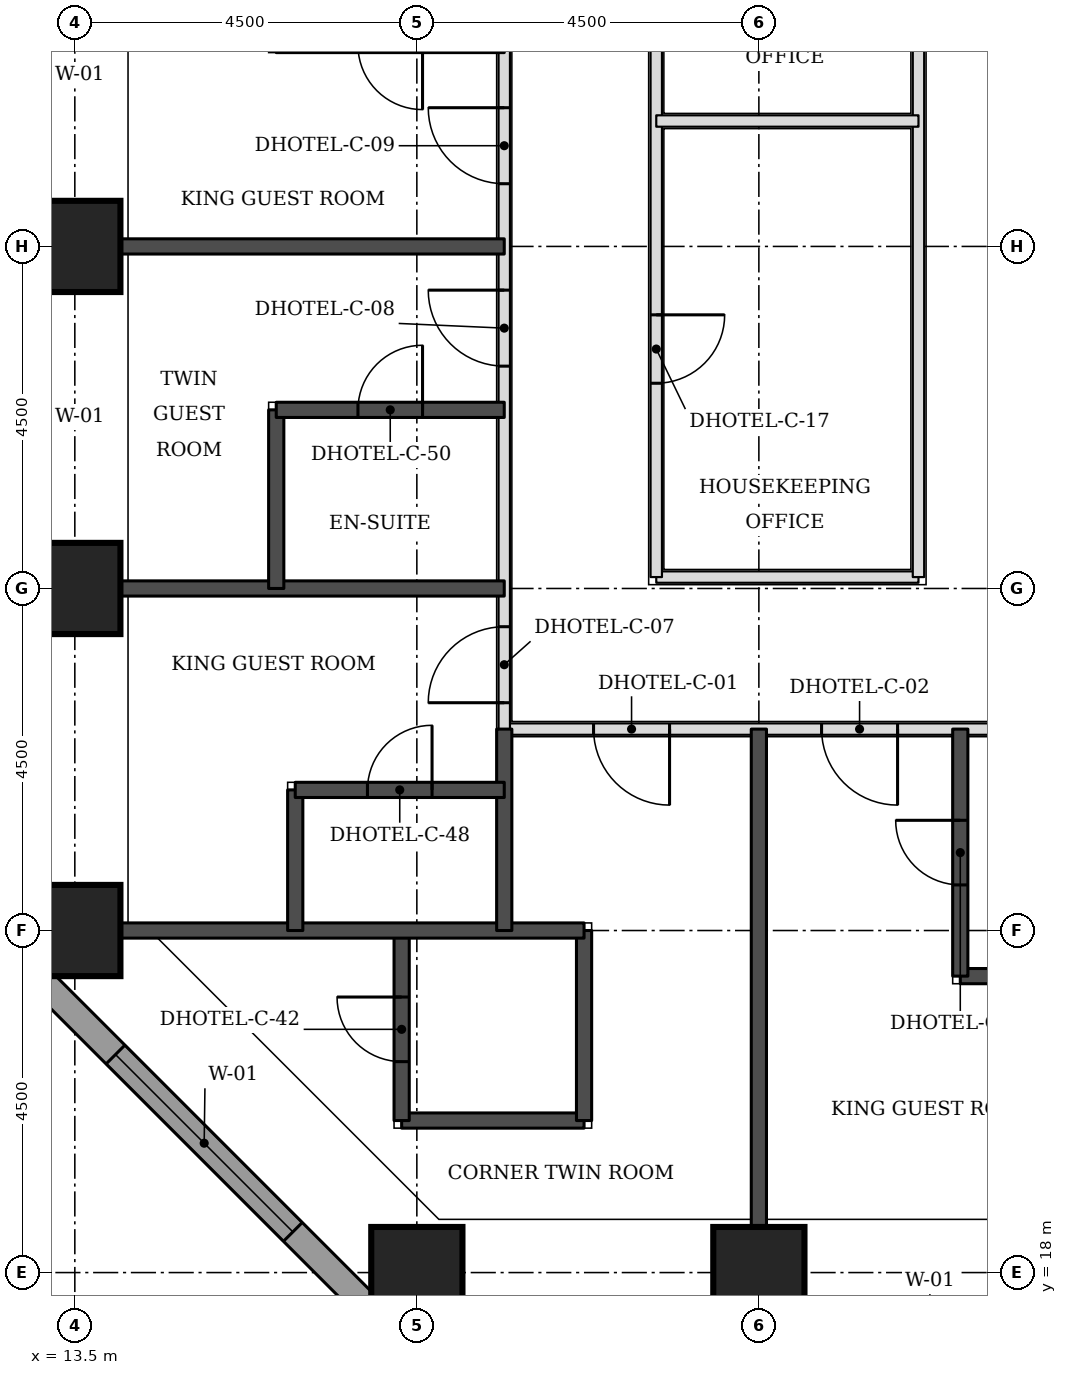
"""IFC4 building model, lengths in metres.
Left out: names, types, materials, properties, quantities, classifications, styles, units other than length and angle.
Written with IfcOpenShell. Run it as: python <this file> out.ifc"""

import sys

from ifc_helpers import new_model, si_unit, direction, frame, frame_2d, origin, origin_2d, place, context, subcontext, project, spatial, rectangle, extrude, element, fill, save


model = new_model("IFC4")
c1 = context("Model", 3, precision=1e-05, world=origin(), true_north=direction((0.0, 1.0)))
c2 = subcontext(c1, "Body", "Model", "MODEL_VIEW")
j1 = project(units=[si_unit("LENGTHUNIT", "METRE"), si_unit("PLANEANGLEUNIT", "RADIAN")], contexts=[c1])
p1 = place(None, origin())
s1 = spatial("IfcSite", under=j1, at=p1, CompositionType="ELEMENT")
p2 = place(p1, origin())
s2 = spatial("IfcBuilding", under=s1, at=p2, CompositionType="ELEMENT")
p3 = place(p2, frame((0.0, 0.0, 56.1)))
s3 = spatial("IfcBuildingStorey", under=s2, at=p3, CompositionType="ELEMENT", Elevation=56.1)
for number, where, z_axis, x_axis in (
    (1, (18.0, 18.0, 0.0), (0.0, 0.0, 1.0), (1.0, 0.0, 0.0)),
    (2, (22.5, 18.0, 0.0), (0.0, 0.0, 1.0), (1.0, 0.0, 0.0)),
    (3, (13.5, 22.5, 0.0), (0.0, 0.0, 1.0), (1.0, 0.0, 0.0)),
    (4, (13.5, 27.0, 0.0), (0.0, 0.0, 1.0), (1.0, 0.0, 0.0)),
    (5, (13.5, 31.5, 0.0), (0.0, 0.0, 1.0), (1.0, 0.0, 0.0)),
):
    element("IfcColumn", number, at=place(p3, frame(where, z_axis=z_axis, x_axis=x_axis)), inside=s3, PredefinedType="COLUMN", context=c2, shape_type="SweptSolid", body=[
        extrude(rectangle(XDim=1.2, YDim=1.2, at=origin_2d()), origin(), (0.0, 0.0, 1.0), 3.3),
    ])
p4 = place(p3, frame((12.674, 22.23, 0.0), z_axis=(0.0, 0.0, 1.0), x_axis=(0.707106781187, -0.707106781187, 0.0)))
e6 = element("IfcWall", 6, at=p4, inside=s3, PredefinedType="STANDARD", context=c2, shape_type="SweptSolid", body=[
    extrude(rectangle(XDim=7.151, YDim=0.35, at=frame_2d((3.576, 0.0))), origin(), (0.0, 0.0, 1.0), 3.055),
])
p5 = place(p4, frame((1.926, 0.0, 0.8)))
e7 = element("IfcOpeningElement", 7, at=p5, cuts=e6, PredefinedType="OPENING", context=c2, shape_type="SweptSolid", body=[
    extrude(rectangle(XDim=3.3, YDim=1.5, at=frame_2d((1.65, 0.75))), frame((0.0, 0.185, 0.0), z_axis=(0.0, -1.0, 0.0), x_axis=(1.0, 0.0, 0.0)), (0.0, 0.0, 1.0), 0.37),
])
p6 = place(p3, frame((19.15, 25.15, 0.0), z_axis=(0.0, 0.0, 1.0), x_axis=(1.0, 0.0, 0.0)))
e8 = element("IfcWall", 8, at=p6, inside=s3, PredefinedType="PARTITIONING", context=c2, shape_type="SweptSolid", body=[
    extrude(rectangle(XDim=33.7, YDim=0.15, at=frame_2d((16.85, 0.0))), origin(), (0.0, 0.0, 1.0), 3.08),
])
p7 = place(p6, frame((4.175, 0.0, 0.0)))
e9 = element("IfcOpeningElement", 9, at=p7, cuts=e8, PredefinedType="OPENING", context=c2, shape_type="SweptSolid", body=[
    extrude(rectangle(XDim=1.0, YDim=2.1, at=frame_2d((0.5, 1.05))), frame((0.0, 0.085, 0.0), z_axis=(0.0, -1.0, 0.0), x_axis=(1.0, 0.0, 0.0)), (0.0, 0.0, 1.0), 0.17),
])
p8 = place(p6, frame((13.325, 0.0, 0.0)))
e10 = element("IfcOpeningElement", 10, at=p8, cuts=e8, PredefinedType="OPENING", context=c2, shape_type="SweptSolid", body=[
    extrude(rectangle(XDim=1.0, YDim=2.1, at=frame_2d((0.5, 1.05))), frame((0.0, 0.085, 0.0), z_axis=(0.0, -1.0, 0.0), x_axis=(1.0, 0.0, 0.0)), (0.0, 0.0, 1.0), 0.17),
])
p9 = place(p6, frame((19.625, 0.0, 0.0)))
e11 = element("IfcOpeningElement", 11, at=p9, cuts=e8, PredefinedType="OPENING", context=c2, shape_type="SweptSolid", body=[
    extrude(rectangle(XDim=1.0, YDim=2.1, at=frame_2d((0.5, 1.05))), frame((0.0, 0.085, 0.0), z_axis=(0.0, -1.0, 0.0), x_axis=(1.0, 0.0, 0.0)), (0.0, 0.0, 1.0), 0.17),
])
p10 = place(p6, frame((28.775, 0.0, 0.0)))
e12 = element("IfcOpeningElement", 12, at=p10, cuts=e8, PredefinedType="OPENING", context=c2, shape_type="SweptSolid", body=[
    extrude(rectangle(XDim=1.0, YDim=2.1, at=frame_2d((0.5, 1.05))), frame((0.0, 0.085, 0.0), z_axis=(0.0, -1.0, 0.0), x_axis=(1.0, 0.0, 0.0)), (0.0, 0.0, 1.0), 0.17),
])
p11 = place(p6, frame((1.175, 0.0, 0.0)))
e13 = element("IfcOpeningElement", 13, at=p11, cuts=e8, PredefinedType="OPENING", context=c2, shape_type="SweptSolid", body=[
    extrude(rectangle(XDim=1.0, YDim=2.1, at=frame_2d((0.5, 1.05))), frame((0.0, 0.085, 0.0), z_axis=(0.0, -1.0, 0.0), x_axis=(1.0, 0.0, 0.0)), (0.0, 0.0, 1.0), 0.17),
])
p12 = place(p6, frame((31.525, 0.0, 0.0)))
e14 = element("IfcOpeningElement", 14, at=p12, cuts=e8, PredefinedType="OPENING", context=c2, shape_type="SweptSolid", body=[
    extrude(rectangle(XDim=1.0, YDim=2.1, at=frame_2d((0.5, 1.05))), frame((0.0, 0.085, 0.0), z_axis=(0.0, -1.0, 0.0), x_axis=(1.0, 0.0, 0.0)), (0.0, 0.0, 1.0), 0.17),
])
p13 = place(p3, frame((19.15, 25.15, 0.0), z_axis=(0.0, 0.0, 1.0), x_axis=(0.0, 1.0, 0.0)))
e15 = element("IfcWall", 15, at=p13, inside=s3, PredefinedType="PARTITIONING", context=c2, shape_type="SweptSolid", body=[
    extrude(rectangle(XDim=24.35, YDim=0.15, at=frame_2d((12.175, 0.0))), origin(), (0.0, 0.0, 1.0), 3.08),
])
p14 = place(p13, frame((0.347, 0.0, 0.0)))
e16 = element("IfcOpeningElement", 16, at=p14, cuts=e15, PredefinedType="OPENING", context=c2, shape_type="SweptSolid", body=[
    extrude(rectangle(XDim=1.0, YDim=2.1, at=frame_2d((0.5, 1.05))), frame((0.0, 0.085, 0.0), z_axis=(0.0, -1.0, 0.0), x_axis=(1.0, 0.0, 0.0)), (0.0, 0.0, 1.0), 0.17),
])
p15 = place(p13, frame((4.775, 0.0, 0.0)))
e17 = element("IfcOpeningElement", 17, at=p15, cuts=e15, PredefinedType="OPENING", context=c2, shape_type="SweptSolid", body=[
    extrude(rectangle(XDim=1.0, YDim=2.1, at=frame_2d((0.5, 1.05))), frame((0.0, 0.085, 0.0), z_axis=(0.0, -1.0, 0.0), x_axis=(1.0, 0.0, 0.0)), (0.0, 0.0, 1.0), 0.17),
])
p16 = place(p13, frame((7.175, 0.0, 0.0)))
e18 = element("IfcOpeningElement", 18, at=p16, cuts=e15, PredefinedType="OPENING", context=c2, shape_type="SweptSolid", body=[
    extrude(rectangle(XDim=1.0, YDim=2.1, at=frame_2d((0.5, 1.05))), frame((0.0, 0.085, 0.0), z_axis=(0.0, -1.0, 0.0), x_axis=(1.0, 0.0, 0.0)), (0.0, 0.0, 1.0), 0.17),
])
p17 = place(p13, frame((13.75, 0.0, 0.0)))
e19 = element("IfcOpeningElement", 19, at=p17, cuts=e15, PredefinedType="OPENING", context=c2, shape_type="SweptSolid", body=[
    extrude(rectangle(XDim=1.0, YDim=2.1, at=frame_2d((0.5, 1.05))), frame((0.0, 0.085, 0.0), z_axis=(0.0, -1.0, 0.0), x_axis=(1.0, 0.0, 0.0)), (0.0, 0.0, 1.0), 0.17),
])
p18 = place(p13, frame((16.175, 0.0, 0.0)))
e20 = element("IfcOpeningElement", 20, at=p18, cuts=e15, PredefinedType="OPENING", context=c2, shape_type="SweptSolid", body=[
    extrude(rectangle(XDim=1.0, YDim=2.1, at=frame_2d((0.5, 1.05))), frame((0.0, 0.085, 0.0), z_axis=(0.0, -1.0, 0.0), x_axis=(1.0, 0.0, 0.0)), (0.0, 0.0, 1.0), 0.17),
])
p19 = place(p13, frame((22.775, 0.0, 0.0)))
e21 = element("IfcOpeningElement", 21, at=p19, cuts=e15, PredefinedType="OPENING", context=c2, shape_type="SweptSolid", body=[
    extrude(rectangle(XDim=1.0, YDim=2.1, at=frame_2d((0.5, 1.05))), frame((0.0, 0.085, 0.0), z_axis=(0.0, -1.0, 0.0), x_axis=(1.0, 0.0, 0.0)), (0.0, 0.0, 1.0), 0.17),
])
p20 = place(p3, frame((21.15, 27.15, 0.0), z_axis=(0.0, 0.0, 1.0), x_axis=(1.0, 0.0, 0.0)))
e22 = element("IfcWall", 22, at=p20, inside=s3, PredefinedType="PARTITIONING", context=c2, shape_type="SweptSolid", body=[
    extrude(rectangle(XDim=3.45, YDim=0.15, at=frame_2d((1.725, 0.0))), origin(), (0.0, 0.0, 1.0), 3.08),
])
p21 = place(p3, frame((21.15, 27.15, 0.0), z_axis=(0.0, 0.0, 1.0), x_axis=(0.0, 1.0, 0.0)))
e23 = element("IfcWall", 23, at=p21, inside=s3, PredefinedType="PARTITIONING", context=c2, shape_type="SweptSolid", body=[
    extrude(rectangle(XDim=15.85, YDim=0.15, at=frame_2d((7.925, 0.0))), origin(), (0.0, 0.0, 1.0), 3.08),
])
p22 = place(p21, frame((2.55, 0.0, 0.0)))
e24 = element("IfcOpeningElement", 24, at=p22, cuts=e23, PredefinedType="OPENING", context=c2, shape_type="SweptSolid", body=[
    extrude(rectangle(XDim=0.9, YDim=2.1, at=frame_2d((0.45, 1.05))), frame((0.0, 0.085, 0.0), z_axis=(0.0, -1.0, 0.0), x_axis=(1.0, 0.0, 0.0)), (0.0, 0.0, 1.0), 0.17),
])
p23 = place(p21, frame((9.225, 0.0, 0.0)))
e25 = element("IfcOpeningElement", 25, at=p23, cuts=e23, PredefinedType="OPENING", context=c2, shape_type="SweptSolid", body=[
    extrude(rectangle(XDim=0.9, YDim=2.1, at=frame_2d((0.45, 1.05))), frame((0.0, 0.085, 0.0), z_axis=(0.0, -1.0, 0.0), x_axis=(1.0, 0.0, 0.0)), (0.0, 0.0, 1.0), 0.17),
])
p24 = place(p3, frame((24.6, 27.15, 0.0), z_axis=(0.0, 0.0, 1.0), x_axis=(0.0, 1.0, 0.0)))
e26 = element("IfcWall", 26, at=p24, inside=s3, PredefinedType="PARTITIONING", context=c2, shape_type="SweptSolid", body=[
    extrude(rectangle(XDim=13.35, YDim=0.15, at=frame_2d((6.675, 0.0))), origin(), (0.0, 0.0, 1.0), 3.08),
])
p25 = place(p3, frame((22.5, 18.6, 0.0), z_axis=(0.0, 0.0, 1.0), x_axis=(0.0, 1.0, 0.0)))
e27 = element("IfcWall", 27, at=p25, inside=s3, PredefinedType="SOLIDWALL", context=c2, shape_type="SweptSolid", body=[
    extrude(rectangle(XDim=6.55, YDim=0.2, at=frame_2d((3.275, 0.0))), origin(), (0.0, 0.0, 1.0), 3.08),
])
p26 = place(p3, frame((17.8, 20.0, 0.0), z_axis=(0.0, 0.0, 1.0), x_axis=(1.0, 0.0, 0.0)))
e28 = element("IfcWall", 28, at=p26, inside=s3, PredefinedType="SOLIDWALL", context=c2, shape_type="SweptSolid", body=[
    extrude(rectangle(XDim=2.4, YDim=0.2, at=frame_2d((1.2, 0.0))), origin(), (0.0, 0.0, 1.0), 3.08),
])
p27 = place(p3, frame((17.8, 20.0, 0.0), z_axis=(0.0, 0.0, 1.0), x_axis=(0.0, 1.0, 0.0)))
e29 = element("IfcWall", 29, at=p27, inside=s3, PredefinedType="SOLIDWALL", context=c2, shape_type="SweptSolid", body=[
    extrude(rectangle(XDim=2.5, YDim=0.2, at=frame_2d((1.25, 0.0))), origin(), (0.0, 0.0, 1.0), 3.08),
])
p28 = place(p27, frame((0.775, 0.0, 0.0)))
e30 = element("IfcOpeningElement", 30, at=p28, cuts=e29, PredefinedType="OPENING", context=c2, shape_type="SweptSolid", body=[
    extrude(rectangle(XDim=0.85, YDim=2.1, at=frame_2d((0.425, 1.05))), frame((0.0, 0.11, 0.0), z_axis=(0.0, -1.0, 0.0), x_axis=(1.0, 0.0, 0.0)), (0.0, 0.0, 1.0), 0.22),
])
p29 = place(p3, frame((20.2, 20.0, 0.0), z_axis=(0.0, 0.0, 1.0), x_axis=(0.0, 1.0, 0.0)))
e31 = element("IfcWall", 31, at=p29, inside=s3, PredefinedType="SOLIDWALL", context=c2, shape_type="SweptSolid", body=[
    extrude(rectangle(XDim=2.5, YDim=0.2, at=frame_2d((1.25, 0.0))), origin(), (0.0, 0.0, 1.0), 3.08),
])
p30 = place(p3, frame((25.15, 21.9, 0.0), z_axis=(0.0, 0.0, 1.0), x_axis=(1.0, 0.0, 0.0)))
e32 = element("IfcWall", 32, at=p30, inside=s3, PredefinedType="SOLIDWALL", context=c2, shape_type="SweptSolid", body=[
    extrude(rectangle(XDim=1.85, YDim=0.2, at=frame_2d((0.925, 0.0))), origin(), (0.0, 0.0, 1.0), 3.08),
])
p31 = place(p3, frame((25.15, 21.9, 0.0), z_axis=(0.0, 0.0, 1.0), x_axis=(0.0, 1.0, 0.0)))
e33 = element("IfcWall", 33, at=p31, inside=s3, PredefinedType="SOLIDWALL", context=c2, shape_type="SweptSolid", body=[
    extrude(rectangle(XDim=3.25, YDim=0.2, at=frame_2d((1.625, 0.0))), origin(), (0.0, 0.0, 1.0), 3.08),
])
p32 = place(p31, frame((1.2, 0.0, 0.0)))
e34 = element("IfcOpeningElement", 34, at=p32, cuts=e33, PredefinedType="OPENING", context=c2, shape_type="SweptSolid", body=[
    extrude(rectangle(XDim=0.85, YDim=2.1, at=frame_2d((0.425, 1.05))), frame((0.0, 0.11, 0.0), z_axis=(0.0, -1.0, 0.0), x_axis=(1.0, 0.0, 0.0)), (0.0, 0.0, 1.0), 0.22),
])
p33 = place(p3, frame((14.1, 22.5, 0.0), z_axis=(0.0, 0.0, 1.0), x_axis=(1.0, 0.0, 0.0)))
e35 = element("IfcWall", 35, at=p33, inside=s3, PredefinedType="SOLIDWALL", context=c2, shape_type="SweptSolid", body=[
    extrude(rectangle(XDim=6.1, YDim=0.2, at=frame_2d((3.05, 0.0))), origin(), (0.0, 0.0, 1.0), 3.08),
])
p34 = place(p3, frame((16.4, 22.5, 0.0), z_axis=(0.0, 0.0, 1.0), x_axis=(0.0, 1.0, 0.0)))
e36 = element("IfcWall", 36, at=p34, inside=s3, PredefinedType="SOLIDWALL", context=c2, shape_type="SweptSolid", body=[
    extrude(rectangle(XDim=1.85, YDim=0.2, at=frame_2d((0.925, 0.0))), origin(), (0.0, 0.0, 1.0), 3.08),
])
p35 = place(p3, frame((19.15, 22.5, 0.0), z_axis=(0.0, 0.0, 1.0), x_axis=(0.0, 1.0, 0.0)))
e37 = element("IfcWall", 37, at=p35, inside=s3, PredefinedType="SOLIDWALL", context=c2, shape_type="SweptSolid", body=[
    extrude(rectangle(XDim=2.65, YDim=0.2, at=frame_2d((1.325, 0.0))), origin(), (0.0, 0.0, 1.0), 3.08),
])
p36 = place(p3, frame((16.4, 24.35, 0.0), z_axis=(0.0, 0.0, 1.0), x_axis=(1.0, 0.0, 0.0)))
e38 = element("IfcWall", 38, at=p36, inside=s3, PredefinedType="SOLIDWALL", context=c2, shape_type="SweptSolid", body=[
    extrude(rectangle(XDim=2.75, YDim=0.2, at=frame_2d((1.375, 0.0))), origin(), (0.0, 0.0, 1.0), 3.08),
])
p37 = place(p36, frame((0.95, 0.0, 0.0)))
e39 = element("IfcOpeningElement", 39, at=p37, cuts=e38, PredefinedType="OPENING", context=c2, shape_type="SweptSolid", body=[
    extrude(rectangle(XDim=0.85, YDim=2.1, at=frame_2d((0.425, 1.05))), frame((0.0, 0.11, 0.0), z_axis=(0.0, -1.0, 0.0), x_axis=(1.0, 0.0, 0.0)), (0.0, 0.0, 1.0), 0.22),
])
p38 = place(p3, frame((14.1, 27.0, 0.0), z_axis=(0.0, 0.0, 1.0), x_axis=(1.0, 0.0, 0.0)))
e40 = element("IfcWall", 40, at=p38, inside=s3, PredefinedType="SOLIDWALL", context=c2, shape_type="SweptSolid", body=[
    extrude(rectangle(XDim=5.05, YDim=0.2, at=frame_2d((2.525, 0.0))), origin(), (0.0, 0.0, 1.0), 3.08),
])
p39 = place(p3, frame((16.15, 27.0, 0.0), z_axis=(0.0, 0.0, 1.0), x_axis=(0.0, 1.0, 0.0)))
e41 = element("IfcWall", 41, at=p39, inside=s3, PredefinedType="SOLIDWALL", context=c2, shape_type="SweptSolid", body=[
    extrude(rectangle(XDim=2.35, YDim=0.2, at=frame_2d((1.175, 0.0))), origin(), (0.0, 0.0, 1.0), 3.08),
])
p40 = place(p3, frame((16.15, 29.35, 0.0), z_axis=(0.0, 0.0, 1.0), x_axis=(1.0, 0.0, 0.0)))
e42 = element("IfcWall", 42, at=p40, inside=s3, PredefinedType="SOLIDWALL", context=c2, shape_type="SweptSolid", body=[
    extrude(rectangle(XDim=3.0, YDim=0.2, at=frame_2d((1.5, 0.0))), origin(), (0.0, 0.0, 1.0), 3.08),
])
p41 = place(p40, frame((1.075, 0.0, 0.0)))
e43 = element("IfcOpeningElement", 43, at=p41, cuts=e42, PredefinedType="OPENING", context=c2, shape_type="SweptSolid", body=[
    extrude(rectangle(XDim=0.85, YDim=2.1, at=frame_2d((0.425, 1.05))), frame((0.0, 0.11, 0.0), z_axis=(0.0, -1.0, 0.0), x_axis=(1.0, 0.0, 0.0)), (0.0, 0.0, 1.0), 0.22),
])
p42 = place(p3, frame((14.1, 31.5, 0.0), z_axis=(0.0, 0.0, 1.0), x_axis=(1.0, 0.0, 0.0)))
e44 = element("IfcWall", 44, at=p42, inside=s3, PredefinedType="SOLIDWALL", context=c2, shape_type="SweptSolid", body=[
    extrude(rectangle(XDim=5.05, YDim=0.2, at=frame_2d((2.525, 0.0))), origin(), (0.0, 0.0, 1.0), 3.08),
])
p43 = place(p3, frame((16.15, 34.15, 0.0), z_axis=(0.0, 0.0, 1.0), x_axis=(1.0, 0.0, 0.0)))
e45 = element("IfcWall", 45, at=p43, inside=s3, PredefinedType="SOLIDWALL", context=c2, shape_type="SweptSolid", body=[
    extrude(rectangle(XDim=3.0, YDim=0.2, at=frame_2d((1.5, 0.0))), origin(), (0.0, 0.0, 1.0), 3.08),
])
p44 = place(p43, frame((1.075, 0.0, 0.0)))
e46 = element("IfcOpeningElement", 46, at=p44, cuts=e45, PredefinedType="OPENING", context=c2, shape_type="SweptSolid", body=[
    extrude(rectangle(XDim=0.85, YDim=2.1, at=frame_2d((0.425, 1.05))), frame((0.0, 0.11, 0.0), z_axis=(0.0, -1.0, 0.0), x_axis=(1.0, 0.0, 0.0)), (0.0, 0.0, 1.0), 0.22),
])
p45 = place(p3, frame((21.15, 33.15, 0.0), z_axis=(0.0, 0.0, 1.0), x_axis=(1.0, 0.0, 0.0)))
e47 = element("IfcWall", 47, at=p45, inside=s3, PredefinedType="PARTITIONING", context=c2, shape_type="SweptSolid", body=[
    extrude(rectangle(XDim=3.45, YDim=0.15, at=frame_2d((1.725, 0.0))), origin(), (0.0, 0.0, 1.0), 3.08),
])
p46 = place(p5, origin())
e48 = element("IfcWindow", 48, at=p46, inside=s3, PartitioningType="SINGLE_PANEL", PredefinedType="WINDOW", context=c2, shape_type="SweptSolid", body=[
    extrude(rectangle(XDim=3.3, YDim=1.5, at=frame_2d((1.65, 0.75))), frame((0.0, 0.085, 0.0), z_axis=(0.0, -1.0, 0.0), x_axis=(1.0, 0.0, 0.0)), (0.0, 0.0, 1.0), 0.06),
])
fill(e7, e48)
p47 = place(p7, frame((1.0, 0.0, 0.0), z_axis=(0.0, 0.0, 1.0), x_axis=(-1.0, 0.0, 0.0)))
e49 = element("IfcDoor", 49, at=p47, inside=s3, OperationType="SINGLE_SWING_LEFT", PredefinedType="DOOR", context=c2, shape_type="SweptSolid", body=[
    extrude(rectangle(XDim=1.0, YDim=2.1, at=frame_2d((0.5, 1.05))), frame((0.0, 0.025, 0.0), z_axis=(0.0, -1.0, 0.0), x_axis=(1.0, 0.0, 0.0)), (0.0, 0.0, 1.0), 0.05),
])
fill(e9, e49)
p48 = place(p32, origin())
e50 = element("IfcDoor", 50, at=p48, inside=s3, OperationType="SINGLE_SWING_RIGHT", PredefinedType="DOOR", context=c2, shape_type="SweptSolid", body=[
    extrude(rectangle(XDim=0.85, YDim=2.1, at=frame_2d((0.425, 1.05))), frame((0.0, 0.025, 0.0), z_axis=(0.0, -1.0, 0.0), x_axis=(1.0, 0.0, 0.0)), (0.0, 0.0, 1.0), 0.05),
])
fill(e34, e50)
p49 = place(p14, origin())
e51 = element("IfcDoor", 51, at=p49, inside=s3, OperationType="SINGLE_SWING_LEFT", PredefinedType="DOOR", context=c2, shape_type="SweptSolid", body=[
    extrude(rectangle(XDim=1.0, YDim=2.1, at=frame_2d((0.5, 1.05))), frame((0.0, 0.025, 0.0), z_axis=(0.0, -1.0, 0.0), x_axis=(1.0, 0.0, 0.0)), (0.0, 0.0, 1.0), 0.05),
])
fill(e16, e51)
p50 = place(p37, origin())
e52 = element("IfcDoor", 52, at=p50, inside=s3, OperationType="SINGLE_SWING_RIGHT", PredefinedType="DOOR", context=c2, shape_type="SweptSolid", body=[
    extrude(rectangle(XDim=0.85, YDim=2.1, at=frame_2d((0.425, 1.05))), frame((0.0, 0.025, 0.0), z_axis=(0.0, -1.0, 0.0), x_axis=(1.0, 0.0, 0.0)), (0.0, 0.0, 1.0), 0.05),
])
fill(e39, e52)
p51 = place(p15, origin())
e53 = element("IfcDoor", 53, at=p51, inside=s3, OperationType="SINGLE_SWING_RIGHT", PredefinedType="DOOR", context=c2, shape_type="SweptSolid", body=[
    extrude(rectangle(XDim=1.0, YDim=2.1, at=frame_2d((0.5, 1.05))), frame((0.0, 0.025, 0.0), z_axis=(0.0, -1.0, 0.0), x_axis=(1.0, 0.0, 0.0)), (0.0, 0.0, 1.0), 0.05),
])
fill(e17, e53)
p52 = place(p41, origin())
e54 = element("IfcDoor", 54, at=p52, inside=s3, OperationType="SINGLE_SWING_RIGHT", PredefinedType="DOOR", context=c2, shape_type="SweptSolid", body=[
    extrude(rectangle(XDim=0.85, YDim=2.1, at=frame_2d((0.425, 1.05))), frame((0.0, 0.025, 0.0), z_axis=(0.0, -1.0, 0.0), x_axis=(1.0, 0.0, 0.0)), (0.0, 0.0, 1.0), 0.05),
])
fill(e43, e54)
p53 = place(p16, origin())
e55 = element("IfcDoor", 55, at=p53, inside=s3, OperationType="SINGLE_SWING_RIGHT", PredefinedType="DOOR", context=c2, shape_type="SweptSolid", body=[
    extrude(rectangle(XDim=1.0, YDim=2.1, at=frame_2d((0.5, 1.05))), frame((0.0, 0.025, 0.0), z_axis=(0.0, -1.0, 0.0), x_axis=(1.0, 0.0, 0.0)), (0.0, 0.0, 1.0), 0.05),
])
fill(e18, e55)
p54 = place(p11, frame((1.0, 0.0, 0.0), z_axis=(0.0, 0.0, 1.0), x_axis=(-1.0, 0.0, 0.0)))
e56 = element("IfcDoor", 56, at=p54, inside=s3, OperationType="SINGLE_SWING_LEFT", PredefinedType="DOOR", context=c2, shape_type="SweptSolid", body=[
    extrude(rectangle(XDim=1.0, YDim=2.1, at=frame_2d((0.5, 1.05))), frame((0.0, 0.025, 0.0), z_axis=(0.0, -1.0, 0.0), x_axis=(1.0, 0.0, 0.0)), (0.0, 0.0, 1.0), 0.05),
])
fill(e13, e56)
p55 = place(p28, origin())
e57 = element("IfcDoor", 57, at=p55, inside=s3, OperationType="SINGLE_SWING_RIGHT", PredefinedType="DOOR", context=c2, shape_type="SweptSolid", body=[
    extrude(rectangle(XDim=0.85, YDim=2.1, at=frame_2d((0.425, 1.05))), frame((0.0, 0.025, 0.0), z_axis=(0.0, -1.0, 0.0), x_axis=(1.0, 0.0, 0.0)), (0.0, 0.0, 1.0), 0.05),
])
fill(e30, e57)
p56 = place(p22, frame((0.9, 0.0, 0.0), z_axis=(0.0, 0.0, 1.0), x_axis=(-1.0, 0.0, 0.0)))
e58 = element("IfcDoor", 58, at=p56, inside=s3, OperationType="SINGLE_SWING_LEFT", PredefinedType="DOOR", context=c2, shape_type="SweptSolid", body=[
    extrude(rectangle(XDim=0.9, YDim=2.1, at=frame_2d((0.45, 1.05))), frame((0.0, 0.025, 0.0), z_axis=(0.0, -1.0, 0.0), x_axis=(1.0, 0.0, 0.0)), (0.0, 0.0, 1.0), 0.05),
])
fill(e24, e58)
save(model, sys.argv[1])
